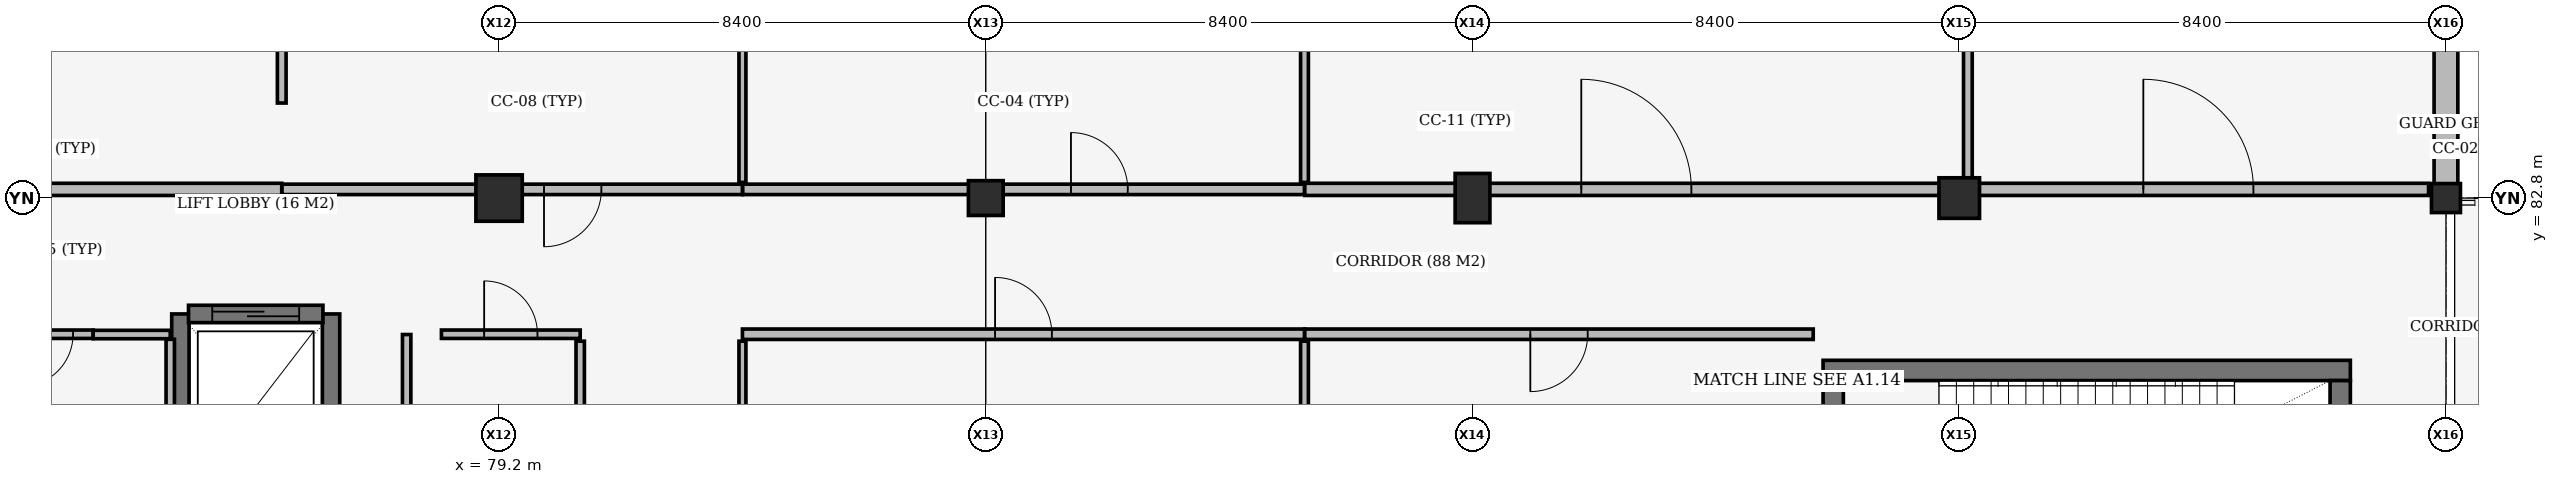
"""IFC4 building model, lengths in metres.
Left out: names, types, materials, properties, quantities, classifications, styles, units other than length and angle.
Written with IfcOpenShell. Run it as: python <this file> out.ifc"""

import sys

from ifc_helpers import new_model, si_unit, direction, frame, frame_2d, origin, origin_2d, place, context, subcontext, project, spatial, rectangle, extrude, element, fill, save


model = new_model("IFC4")
c1 = context("Model", 3, precision=1e-05, world=origin(), true_north=direction((0.0, 1.0)))
c2 = subcontext(c1, "Body", "Model", "MODEL_VIEW")
j1 = project(units=[si_unit("LENGTHUNIT", "METRE"), si_unit("PLANEANGLEUNIT", "RADIAN")], contexts=[c1])
p1 = place(None, origin())
s1 = spatial("IfcSite", under=j1, at=p1, CompositionType="ELEMENT")
p2 = place(p1, origin())
s2 = spatial("IfcBuilding", under=s1, at=p2, CompositionType="ELEMENT")
p3 = place(p2, origin())
s3 = spatial("IfcBuildingStorey", under=s2, at=p3, CompositionType="ELEMENT", Elevation=0.0)
p4 = place(p3, frame((79.2, 82.8, 0.0), z_axis=(0.0, 0.0, 1.0), x_axis=(1.0, 0.0, 0.0)))
e1 = element("IfcColumn", 1, at=p4, inside=s3, PredefinedType="COLUMN", context=c2, shape_type="SweptSolid", body=[
    extrude(rectangle(XDim=0.8, YDim=0.8, at=origin_2d()), origin(), (0.0, 0.0, 1.0), 5.08),
])
p5 = place(p3, frame((87.6, 82.8, 0.0), z_axis=(0.0, 0.0, 1.0), x_axis=(1.0, 0.0, 0.0)))
e2 = element("IfcColumn", 2, at=p5, inside=s3, PredefinedType="COLUMN", context=c2, shape_type="SweptSolid", body=[
    extrude(rectangle(XDim=0.6, YDim=0.6, at=origin_2d()), origin(), (0.0, 0.0, 1.0), 5.08),
])
p6 = place(p3, frame((96.0, 82.8, 0.0), z_axis=(0.0, 0.0, 1.0), x_axis=(1.0, 0.0, 0.0)))
e3 = element("IfcColumn", 3, at=p6, inside=s3, PredefinedType="COLUMN", context=c2, shape_type="SweptSolid", body=[
    extrude(rectangle(XDim=0.6, YDim=0.85, at=origin_2d()), origin(), (0.0, 0.0, 1.0), 5.08),
])
p7 = place(p3, frame((104.4, 82.8, 0.0), z_axis=(0.0, 0.0, 1.0), x_axis=(1.0, 0.0, 0.0)))
e4 = element("IfcColumn", 4, at=p7, inside=s3, PredefinedType="COLUMN", context=c2, shape_type="SweptSolid", body=[
    extrude(rectangle(XDim=0.7, YDim=0.7, at=origin_2d()), origin(), (0.0, 0.0, 1.0), 5.08),
])
p8 = place(p3, frame((112.8, 82.8, 0.0), z_axis=(0.0, 0.0, 1.0), x_axis=(1.0, 0.0, 0.0)))
e5 = element("IfcColumn", 5, at=p8, inside=s3, PredefinedType="COLUMN", context=c2, shape_type="SweptSolid", body=[
    extrude(rectangle(XDim=0.5, YDim=0.5, at=origin_2d()), origin(), (0.0, 0.0, 1.0), 5.08),
])
p9 = place(p3, frame((111.15, 79.825, 0.0), z_axis=(0.0, 0.0, 1.0), x_axis=(-1.0, 0.0, 0.0)))
e6 = element("IfcWall", 6, at=p9, inside=s3, PredefinedType="SHEAR", context=c2, shape_type="SweptSolid", body=[
    extrude(rectangle(XDim=9.1, YDim=0.35, at=frame_2d((4.55, 0.0))), origin(), (0.0, 0.0, 1.0), 5.08),
])
p10 = place(p3, frame((110.975, 76.2, 0.0), z_axis=(0.0, 0.0, 1.0), x_axis=(0.0, 1.0, 0.0)))
e7 = element("IfcWall", 7, at=p10, inside=s3, PredefinedType="SHEAR", context=c2, shape_type="SweptSolid", body=[
    extrude(rectangle(XDim=3.45, YDim=0.35, at=frame_2d((1.725, 0.0))), origin(), (0.0, 0.0, 1.0), 5.08),
])
for number, where, z_axis, x_axis in (
    (8, (73.7, 80.8, 0.0), (0.0, 0.0, 1.0), (0.0, -1.0, 0.0)),
    (9, (76.3, 77.6, 0.0), (0.0, 0.0, 1.0), (0.0, 1.0, 0.0)),
):
    element("IfcWall", number, at=place(p3, frame(where, z_axis=z_axis, x_axis=x_axis)), inside=s3, PredefinedType="SHEAR", context=c2, shape_type="SweptSolid", body=[
        extrude(rectangle(XDim=3.2, YDim=0.3, at=frame_2d((1.6, 0.0))), origin(), (0.0, 0.0, 1.0), 5.08),
    ])
p11 = place(p3, frame((112.8, 86.223, 0.0), z_axis=(0.0, 0.0, 1.0), x_axis=(0.0, -1.0, 0.0)))
e10 = element("IfcWall", 10, at=p11, inside=s3, PredefinedType="STANDARD", context=c2, shape_type="SweptSolid", body=[
    extrude(rectangle(XDim=3.181, YDim=0.41, at=frame_2d((1.59, 0.0))), origin(), (0.0, 0.0, 1.0), 4.28),
])
p12 = place(p3, frame((102.225, 79.65, 0.0), z_axis=(0.0, 0.0, 1.0), x_axis=(0.0, -1.0, 0.0)))
e11 = element("IfcWall", 11, at=p12, inside=s3, PredefinedType="SHEAR", context=c2, shape_type="SweptSolid", body=[
    extrude(rectangle(XDim=3.45, YDim=0.35, at=frame_2d((1.725, 0.0))), origin(), (0.0, 0.0, 1.0), 5.08),
])
p13 = place(p12, frame((1.035, 0.0, 0.0)))
e12 = element("IfcOpeningElement", 12, at=p13, cuts=e11, PredefinedType="OPENING", context=c2, shape_type="SweptSolid", body=[
    extrude(rectangle(XDim=1.38, YDim=2.2, at=frame_2d((0.69, 1.1))), frame((0.0, 0.185, 0.0), z_axis=(0.0, -1.0, 0.0), x_axis=(1.0, 0.0, 0.0)), (0.0, 0.0, 1.0), 0.37),
])
p14 = place(p3, frame((73.84, 80.8, 0.0), z_axis=(0.0, 0.0, 1.0), x_axis=(1.0, 0.0, 0.0)))
e13 = element("IfcWall", 13, at=p14, inside=s3, PredefinedType="SHEAR", context=c2, shape_type="SweptSolid", body=[
    extrude(rectangle(XDim=2.32, YDim=0.3, at=frame_2d((1.16, 0.0))), origin(), (0.0, 0.0, 1.0), 5.08),
])
p15 = place(p14, frame((0.41, 0.0, 0.0)))
e14 = element("IfcOpeningElement", 14, at=p15, cuts=e13, PredefinedType="OPENING", context=c2, shape_type="SweptSolid", body=[
    extrude(rectangle(XDim=1.5, YDim=2.2, at=frame_2d((0.75, 1.1))), frame((0.0, 0.16, 0.0), z_axis=(0.0, -1.0, 0.0), x_axis=(1.0, 0.0, 0.0)), (0.0, 0.0, 1.0), 0.32),
])
p16 = place(p3, frame((70.6, 80.45, 0.0), z_axis=(0.0, 0.0, 1.0), x_axis=(1.0, 0.0, 0.0)))
e15 = element("IfcWall", 15, at=p16, inside=s3, PredefinedType="PLUMBINGWALL", context=c2, shape_type="SweptSolid", body=[
    extrude(rectangle(XDim=1.595, YDim=0.145, at=frame_2d((0.797, 0.0))), origin(), (0.0, 0.0, 1.0), 4.28),
])
p17 = place(p16, frame((0.347, 0.0, 0.0)))
e16 = element("IfcOpeningElement", 16, at=p17, cuts=e15, PredefinedType="OPENING", context=c2, shape_type="SweptSolid", body=[
    extrude(rectangle(XDim=0.9, YDim=2.1, at=frame_2d((0.45, 1.05))), frame((0.0, 0.083, 0.0), z_axis=(0.0, -1.0, 0.0), x_axis=(1.0, 0.0, 0.0)), (0.0, 0.0, 1.0), 0.165),
])
p18 = place(p3, frame((78.205, 80.45, 0.0), z_axis=(0.0, 0.0, 1.0), x_axis=(1.0, 0.0, 0.0)))
e17 = element("IfcWall", 17, at=p18, inside=s3, PredefinedType="PLUMBINGWALL", context=c2, shape_type="SweptSolid", body=[
    extrude(rectangle(XDim=2.395, YDim=0.145, at=frame_2d((1.198, 0.0))), origin(), (0.0, 0.0, 1.0), 4.43),
])
p19 = place(p18, frame((0.738, 0.0, 0.0)))
e18 = element("IfcOpeningElement", 18, at=p19, cuts=e17, PredefinedType="OPENING", context=c2, shape_type="SweptSolid", body=[
    extrude(rectangle(XDim=0.92, YDim=2.1, at=frame_2d((0.46, 1.05))), frame((0.0, 0.083, 0.0), z_axis=(0.0, -1.0, 0.0), x_axis=(1.0, 0.0, 0.0)), (0.0, 0.0, 1.0), 0.165),
])
p20 = place(p3, frame((80.6, 76.55, 0.0), z_axis=(0.0, 0.0, 1.0), x_axis=(0.0, 1.0, 0.0)))
e19 = element("IfcWall", 19, at=p20, inside=s3, PredefinedType="PLUMBINGWALL", context=c2, shape_type="SweptSolid", body=[
    extrude(rectangle(XDim=3.78, YDim=0.145, at=frame_2d((1.89, 0.0))), origin(), (0.0, 0.0, 1.0), 5.08),
])
p21 = place(p3, frame((83.4, 80.45, 0.0), z_axis=(0.0, 0.0, 1.0), x_axis=(1.0, 0.0, 0.0)))
e20 = element("IfcWall", 20, at=p21, inside=s3, PredefinedType="PARTITIONING", context=c2, shape_type="SweptSolid", body=[
    extrude(rectangle(XDim=9.7, YDim=0.18, at=frame_2d((4.85, 0.0))), origin(), (0.0, 0.0, 1.0), 4.33),
])
p22 = place(p21, frame((4.36, 0.0, 0.0)))
e21 = element("IfcOpeningElement", 21, at=p22, cuts=e20, PredefinedType="OPENING", context=c2, shape_type="SweptSolid", body=[
    extrude(rectangle(XDim=0.98, YDim=2.18, at=frame_2d((0.49, 1.09))), frame((0.0, 0.1, 0.0), z_axis=(0.0, -1.0, 0.0), x_axis=(1.0, 0.0, 0.0)), (0.0, 0.0, 1.0), 0.2),
])
p23 = place(p3, frame((83.4, 75.85, 0.0), z_axis=(0.0, 0.0, 1.0), x_axis=(0.0, 1.0, 0.0)))
e22 = element("IfcWall", 22, at=p23, inside=s3, PredefinedType="PARTITIONING", context=c2, shape_type="SweptSolid", body=[
    extrude(rectangle(XDim=4.48, YDim=0.12, at=frame_2d((2.24, 0.0))), origin(), (0.0, 0.0, 1.0), 5.08),
])
p24 = place(p3, frame((93.1, 75.85, 0.0), z_axis=(0.0, 0.0, 1.0), x_axis=(0.0, 1.0, 0.0)))
e23 = element("IfcWall", 23, at=p24, inside=s3, PredefinedType="PARTITIONING", context=c2, shape_type="SweptSolid", body=[
    extrude(rectangle(XDim=4.48, YDim=0.135, at=frame_2d((2.24, 0.0))), origin(), (0.0, 0.0, 1.0), 4.72),
])
p25 = place(p3, frame((93.105, 80.45, 0.0), z_axis=(0.0, 0.0, 1.0), x_axis=(1.0, 0.0, 0.0)))
e24 = element("IfcWall", 24, at=p25, inside=s3, PredefinedType="PARTITIONING", context=c2, shape_type="SweptSolid", body=[
    extrude(rectangle(XDim=8.775, YDim=0.18, at=frame_2d((4.387, 0.0))), origin(), (0.0, 0.0, 1.0), 4.48),
])
p26 = place(p25, frame((3.893, 0.0, 0.0)))
e25 = element("IfcOpeningElement", 25, at=p26, cuts=e24, PredefinedType="OPENING", context=c2, shape_type="SweptSolid", body=[
    extrude(rectangle(XDim=0.99, YDim=2.18, at=frame_2d((0.495, 1.09))), frame((0.0, 0.1, 0.0), z_axis=(0.0, -1.0, 0.0), x_axis=(1.0, 0.0, 0.0)), (0.0, 0.0, 1.0), 0.2),
])
p27 = place(p3, frame((64.005, 82.95, 0.0), z_axis=(0.0, 0.0, 1.0), x_axis=(1.0, 0.0, 0.0)))
e26 = element("IfcWall", 26, at=p27, inside=s3, PredefinedType="STANDARD", context=c2, shape_type="SweptSolid", body=[
    extrude(rectangle(XDim=11.444, YDim=0.21, at=frame_2d((5.722, 0.0))), origin(), (0.0, 0.0, 1.0), 4.28),
])
p28 = place(p27, frame((3.34, 0.0, 0.0)))
e27 = element("IfcOpeningElement", 27, at=p28, cuts=e26, PredefinedType="OPENING", context=c2, shape_type="SweptSolid", body=[
    extrude(rectangle(XDim=1.9, YDim=2.35, at=frame_2d((0.95, 1.175))), frame((0.0, 0.115, 0.0), z_axis=(0.0, -1.0, 0.0), x_axis=(1.0, 0.0, 0.0)), (0.0, 0.0, 1.0), 0.23),
])
p29 = place(p3, frame((75.449, 84.44, 0.0), z_axis=(0.0, 0.0, 1.0), x_axis=(0.0, 1.0, 0.0)))
e28 = element("IfcWall", 28, at=p29, inside=s3, PredefinedType="PARTITIONING", context=c2, shape_type="SweptSolid", body=[
    extrude(rectangle(XDim=34.11, YDim=0.15, at=frame_2d((17.055, 0.0))), origin(), (0.0, 0.0, 1.0), 4.33),
])
p30 = place(p3, frame((75.454, 82.95, 0.0), z_axis=(0.0, 0.0, 1.0), x_axis=(1.0, 0.0, 0.0)))
e29 = element("IfcWall", 29, at=p30, inside=s3, PredefinedType="PARTITIONING", context=c2, shape_type="SweptSolid", body=[
    extrude(rectangle(XDim=7.946, YDim=0.18, at=frame_2d((3.973, 0.0))), origin(), (0.0, 0.0, 1.0), 4.28),
])
p31 = place(p30, frame((4.521, 0.0, 0.0)))
e30 = element("IfcOpeningElement", 30, at=p31, cuts=e29, PredefinedType="OPENING", context=c2, shape_type="SweptSolid", body=[
    extrude(rectangle(XDim=0.99, YDim=2.18, at=frame_2d((0.495, 1.09))), frame((0.0, 0.1, 0.0), z_axis=(0.0, -1.0, 0.0), x_axis=(1.0, 0.0, 0.0)), (0.0, 0.0, 1.0), 0.2),
])
p32 = place(p3, frame((83.4, 83.07, 0.0), z_axis=(0.0, 0.0, 1.0), x_axis=(0.0, 1.0, 0.0)))
e31 = element("IfcWall", 31, at=p32, inside=s3, PredefinedType="PARTITIONING", context=c2, shape_type="SweptSolid", body=[
    extrude(rectangle(XDim=35.48, YDim=0.12, at=frame_2d((17.74, 0.0))), origin(), (0.0, 0.0, 1.0), 4.28),
])
p33 = place(p3, frame((83.405, 82.95, 0.0), z_axis=(0.0, 0.0, 1.0), x_axis=(1.0, 0.0, 0.0)))
e32 = element("IfcWall", 32, at=p33, inside=s3, PredefinedType="PARTITIONING", context=c2, shape_type="SweptSolid", body=[
    extrude(rectangle(XDim=9.695, YDim=0.18, at=frame_2d((4.848, 0.0))), origin(), (0.0, 0.0, 1.0), 4.28),
])
p34 = place(p33, frame((5.665, 0.0, 0.0)))
e33 = element("IfcOpeningElement", 33, at=p34, cuts=e32, PredefinedType="OPENING", context=c2, shape_type="SweptSolid", body=[
    extrude(rectangle(XDim=0.98, YDim=2.18, at=frame_2d((0.49, 1.09))), frame((0.0, 0.1, 0.0), z_axis=(0.0, -1.0, 0.0), x_axis=(1.0, 0.0, 0.0)), (0.0, 0.0, 1.0), 0.2),
])
p35 = place(p3, frame((93.1, 83.07, 0.0), z_axis=(0.0, 0.0, 1.0), x_axis=(0.0, 1.0, 0.0)))
e34 = element("IfcWall", 34, at=p35, inside=s3, PredefinedType="PARTITIONING", context=c2, shape_type="SweptSolid", body=[
    extrude(rectangle(XDim=35.48, YDim=0.135, at=frame_2d((17.74, 0.0))), origin(), (0.0, 0.0, 1.0), 4.33),
])
p36 = place(p3, frame((93.105, 82.95, 0.0), z_axis=(0.0, 0.0, 1.0), x_axis=(1.0, 0.0, 0.0)))
e35 = element("IfcWall", 35, at=p36, inside=s3, PredefinedType="STANDARD", context=c2, shape_type="SweptSolid", body=[
    extrude(rectangle(XDim=11.444, YDim=0.21, at=frame_2d((5.722, 0.0))), origin(), (0.0, 0.0, 1.0), 4.33),
])
p37 = place(p36, frame((4.772, 0.0, 0.0)))
e36 = element("IfcOpeningElement", 36, at=p37, cuts=e35, PredefinedType="OPENING", context=c2, shape_type="SweptSolid", body=[
    extrude(rectangle(XDim=1.9, YDim=2.35, at=frame_2d((0.95, 1.175))), frame((0.0, 0.115, 0.0), z_axis=(0.0, -1.0, 0.0), x_axis=(1.0, 0.0, 0.0)), (0.0, 0.0, 1.0), 0.23),
])
p38 = place(p3, frame((104.549, 83.07, 0.0), z_axis=(0.0, 0.0, 1.0), x_axis=(0.0, 1.0, 0.0)))
e37 = element("IfcWall", 37, at=p38, inside=s3, PredefinedType="PARTITIONING", context=c2, shape_type="SweptSolid", body=[
    extrude(rectangle(XDim=35.48, YDim=0.15, at=frame_2d((17.74, 0.0))), origin(), (0.0, 0.0, 1.0), 4.38),
])
p39 = place(p3, frame((104.554, 82.95, 0.0), z_axis=(0.0, 0.0, 1.0), x_axis=(1.0, 0.0, 0.0)))
e38 = element("IfcWall", 38, at=p39, inside=s3, PredefinedType="STANDARD", context=c2, shape_type="SweptSolid", body=[
    extrude(rectangle(XDim=7.946, YDim=0.21, at=frame_2d((3.973, 0.0))), origin(), (0.0, 0.0, 1.0), 4.33),
])
p40 = place(p39, frame((3.023, 0.0, 0.0)))
e39 = element("IfcOpeningElement", 39, at=p40, cuts=e38, PredefinedType="OPENING", context=c2, shape_type="SweptSolid", body=[
    extrude(rectangle(XDim=1.9, YDim=2.35, at=frame_2d((0.95, 1.175))), frame((0.0, 0.115, 0.0), z_axis=(0.0, -1.0, 0.0), x_axis=(1.0, 0.0, 0.0)), (0.0, 0.0, 1.0), 0.23),
])
p41 = place(p3, frame((72.195, 80.445, 0.0), z_axis=(0.0, 0.0, 1.0), x_axis=(1.0, 0.0, 0.0)))
e40 = element("IfcWall", 40, at=p41, inside=s3, PredefinedType="PLUMBINGWALL", context=c2, shape_type="SweptSolid", body=[
    extrude(rectangle(XDim=1.33, YDim=0.145, at=frame_2d((0.665, 0.0))), origin(), (0.0, 0.0, 1.0), 5.08),
])
p42 = place(p3, frame((73.525, 76.637, 0.0), z_axis=(0.0, 0.0, 1.0), x_axis=(0.0, 1.0, 0.0)))
e41 = element("IfcWall", 41, at=p42, inside=s3, PredefinedType="PLUMBINGWALL", context=c2, shape_type="SweptSolid", body=[
    extrude(rectangle(XDim=3.725, YDim=0.145, at=frame_2d((1.863, 0.0))), origin(), (0.0, 0.0, 1.0), 5.08),
])
p43 = place(p3, frame((77.605, 76.555, 0.0), z_axis=(0.0, 0.0, 1.0), x_axis=(0.0, 1.0, 0.0)))
e42 = element("IfcWall", 42, at=p43, inside=s3, PredefinedType="PLUMBINGWALL", context=c2, shape_type="SweptSolid", body=[
    extrude(rectangle(XDim=3.89, YDim=0.145, at=frame_2d((1.945, 0.0))), origin(), (0.0, 0.0, 1.0), 5.08),
])
p44 = place(p15, origin())
e43 = element("IfcDoor", 43, at=p44, inside=s3, OperationType="SLIDING_TO_LEFT", PredefinedType="DOOR", context=c2, shape_type="SweptSolid", body=[
    extrude(rectangle(XDim=1.5, YDim=2.2, at=frame_2d((0.75, 1.1))), frame((0.0, 0.025, 0.0), z_axis=(0.0, -1.0, 0.0), x_axis=(1.0, 0.0, 0.0)), (0.0, 0.0, 1.0), 0.05),
])
fill(e14, e43)
p45 = place(p17, origin())
e44 = element("IfcDoor", 44, at=p45, inside=s3, OperationType="SINGLE_SWING_RIGHT", PredefinedType="DOOR", context=c2, shape_type="SweptSolid", body=[
    extrude(rectangle(XDim=0.9, YDim=2.1, at=frame_2d((0.45, 1.05))), frame((0.0, 0.025, 0.0), z_axis=(0.0, -1.0, 0.0), x_axis=(1.0, 0.0, 0.0)), (0.0, 0.0, 1.0), 0.05),
])
fill(e16, e44)
p46 = place(p19, origin())
e45 = element("IfcDoor", 45, at=p46, inside=s3, OperationType="SINGLE_SWING_LEFT", PredefinedType="DOOR", context=c2, shape_type="SweptSolid", body=[
    extrude(rectangle(XDim=0.92, YDim=2.1, at=frame_2d((0.46, 1.05))), frame((0.0, 0.025, 0.0), z_axis=(0.0, -1.0, 0.0), x_axis=(1.0, 0.0, 0.0)), (0.0, 0.0, 1.0), 0.05),
])
fill(e18, e45)
p47 = place(p22, origin())
e46 = element("IfcDoor", 46, at=p47, inside=s3, OperationType="SINGLE_SWING_LEFT", PredefinedType="DOOR", context=c2, shape_type="SweptSolid", body=[
    extrude(rectangle(XDim=0.98, YDim=2.18, at=frame_2d((0.49, 1.09))), frame((0.0, 0.025, 0.0), z_axis=(0.0, -1.0, 0.0), x_axis=(1.0, 0.0, 0.0)), (0.0, 0.0, 1.0), 0.05),
])
fill(e21, e46)
p48 = place(p26, origin())
e47 = element("IfcDoor", 47, at=p48, inside=s3, OperationType="SINGLE_SWING_RIGHT", PredefinedType="DOOR", context=c2, shape_type="SweptSolid", body=[
    extrude(rectangle(XDim=0.99, YDim=2.18, at=frame_2d((0.495, 1.09))), frame((0.0, 0.025, 0.0), z_axis=(0.0, -1.0, 0.0), x_axis=(1.0, 0.0, 0.0)), (0.0, 0.0, 1.0), 0.05),
])
fill(e25, e47)
p49 = place(p31, origin())
e48 = element("IfcDoor", 48, at=p49, inside=s3, OperationType="SINGLE_SWING_RIGHT", PredefinedType="DOOR", context=c2, shape_type="SweptSolid", body=[
    extrude(rectangle(XDim=0.99, YDim=2.18, at=frame_2d((0.495, 1.09))), frame((0.0, 0.025, 0.0), z_axis=(0.0, -1.0, 0.0), x_axis=(1.0, 0.0, 0.0)), (0.0, 0.0, 1.0), 0.05),
])
fill(e30, e48)
p50 = place(p34, origin())
e49 = element("IfcDoor", 49, at=p50, inside=s3, OperationType="SINGLE_SWING_LEFT", PredefinedType="DOOR", context=c2, shape_type="SweptSolid", body=[
    extrude(rectangle(XDim=0.98, YDim=2.18, at=frame_2d((0.49, 1.09))), frame((0.0, 0.025, 0.0), z_axis=(0.0, -1.0, 0.0), x_axis=(1.0, 0.0, 0.0)), (0.0, 0.0, 1.0), 0.05),
])
fill(e33, e49)
p51 = place(p37, origin())
e50 = element("IfcDoor", 50, at=p51, inside=s3, OperationType="DOUBLE_DOOR_SINGLE_SWING", PredefinedType="DOOR", context=c2, shape_type="SweptSolid", body=[
    extrude(rectangle(XDim=1.9, YDim=2.35, at=frame_2d((0.95, 1.175))), frame((0.0, 0.025, 0.0), z_axis=(0.0, -1.0, 0.0), x_axis=(1.0, 0.0, 0.0)), (0.0, 0.0, 1.0), 0.05),
])
fill(e36, e50)
p52 = place(p40, origin())
e51 = element("IfcDoor", 51, at=p52, inside=s3, OperationType="DOUBLE_DOOR_SINGLE_SWING", PredefinedType="DOOR", context=c2, shape_type="SweptSolid", body=[
    extrude(rectangle(XDim=1.9, YDim=2.35, at=frame_2d((0.95, 1.175))), frame((0.0, 0.025, 0.0), z_axis=(0.0, -1.0, 0.0), x_axis=(1.0, 0.0, 0.0)), (0.0, 0.0, 1.0), 0.05),
])
fill(e39, e51)
save(model, sys.argv[1])
